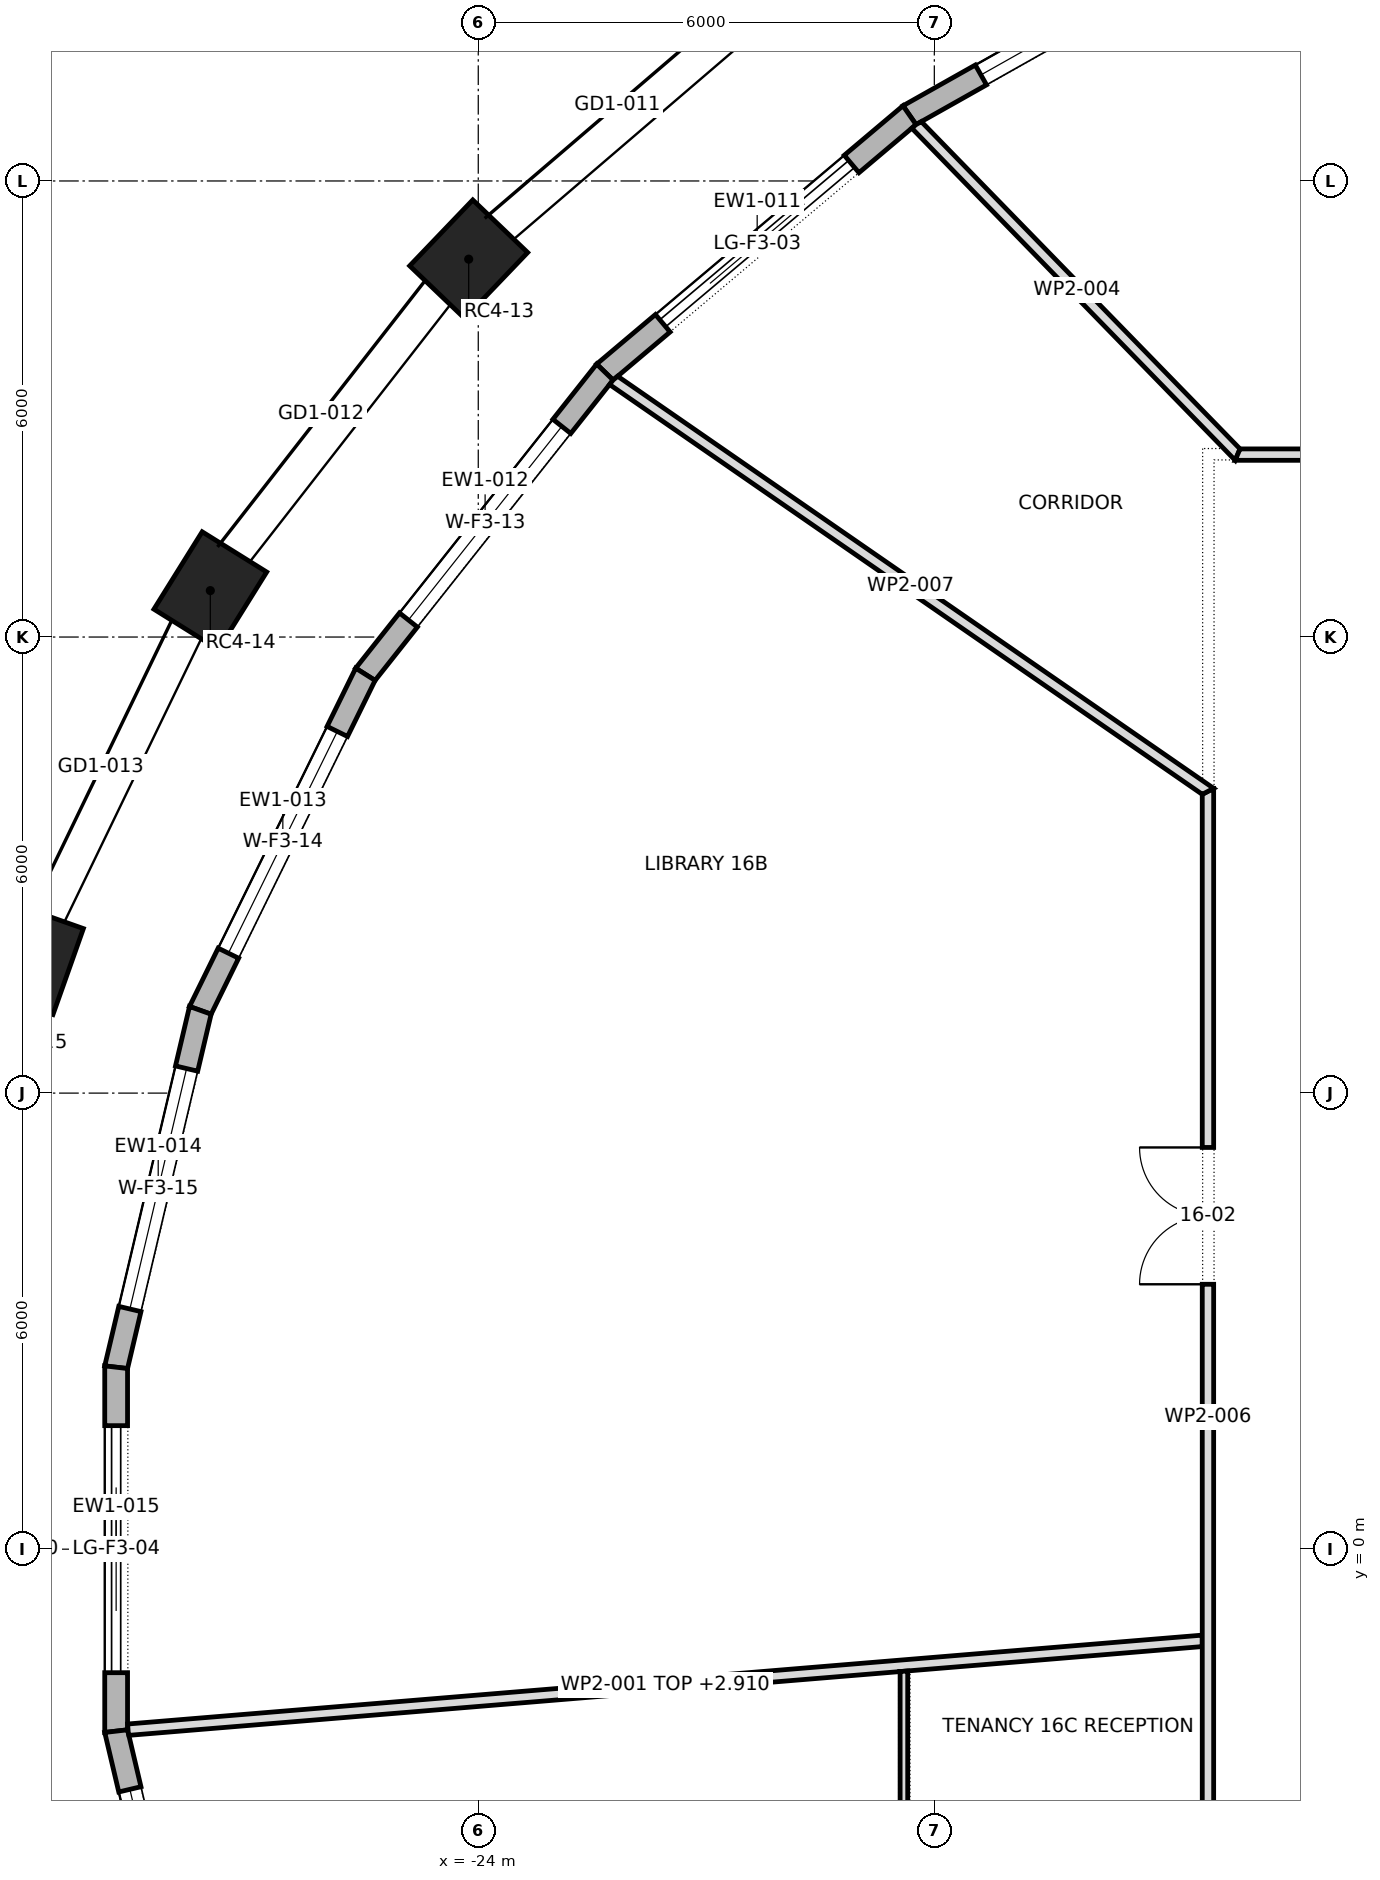
"""IFC4 building model, lengths in metres.
Left out: names, types, materials, properties, quantities, classifications, styles, units other than length and angle.
Written with IfcOpenShell. Run it as: python <this file> out.ifc"""

import sys

from ifc_helpers import new_model, si_unit, direction, frame, frame_2d, origin, origin_2d, place, context, subcontext, project, spatial, polyline, rectangle, outline, extrude, element, fill, save


model = new_model("IFC4")
c1 = context("Model", 3, precision=1e-05, world=origin(), true_north=direction((0.0, 1.0)))
c2 = subcontext(c1, "Body", "Model", "MODEL_VIEW")
j1 = project(units=[si_unit("LENGTHUNIT", "METRE"), si_unit("PLANEANGLEUNIT", "RADIAN")], contexts=[c1])
p1 = place(None, origin())
s1 = spatial("IfcSite", under=j1, at=p1, CompositionType="ELEMENT")
p2 = place(p1, origin())
s2 = spatial("IfcBuilding", under=s1, at=p2, CompositionType="ELEMENT")
p3 = place(p2, frame((0.0, 0.0, 234.9)))
s3 = spatial("IfcBuildingStorey", under=s2, at=p3, CompositionType="ELEMENT", Elevation=234.9)
for number, where, z_axis, x_axis in (
    (1, (-24.126, 16.971, 0.0), (0.0, 0.0, 1.0), (-0.692, -0.722, 0.0)),
    (2, (-27.525, 12.611, 0.0), (0.0, 0.0, 1.0), (-0.529, -0.849, 0.0)),
    (3, (-29.867, 7.766, 0.0), (0.0, 0.0, 1.0), (-0.334, -0.943, 0.0)),
):
    element("IfcColumn", number, at=place(p3, frame(where, z_axis=z_axis, x_axis=x_axis)), inside=s3, PredefinedType="COLUMN", context=c2, shape_type="SweptSolid", body=[
        extrude(rectangle(XDim=1.2, YDim=1.0, at=origin_2d()), origin(), (0.0, 0.0, 1.0), 4.0),
    ])
p4 = place(p3, frame((-13.616, 21.52, 0.0), z_axis=(0.0, 0.0, 1.0), x_axis=(-0.871225596594, -0.490882837181, 0.0)))
e4 = element("IfcWall", 4, at=p4, inside=s3, PredefinedType="STANDARD", context=c2, shape_type="SweptSolid", body=[
    extrude(outline(polyline([(-0.013, -0.15), (5.421, -0.15), (5.393, 0.15), (0.013, 0.15), (-0.013, -0.15)])), origin(), (0.0, 0.0, 1.0), 3.7),
])
p5 = place(p4, frame((1.078, 0.0, 0.6)))
e5 = element("IfcOpeningElement", 5, at=p5, cuts=e4, PredefinedType="OPENING", context=c2, shape_type="SweptSolid", body=[
    extrude(rectangle(XDim=3.25, YDim=2.65, at=frame_2d((1.625, 1.325))), frame((0.0, 0.162, 0.0), z_axis=(0.0, -1.0, 0.0), x_axis=(1.0, 0.0, 0.0)), (0.0, 0.0, 1.0), 0.324),
])
p6 = place(p3, frame((-18.326, 18.865, 0.0), z_axis=(0.0, 0.0, 1.0), x_axis=(-0.764475071601, -0.644653290459, 0.0)))
e6 = element("IfcWall", 6, at=p6, inside=s3, PredefinedType="STANDARD", context=c2, shape_type="SweptSolid", body=[
    extrude(outline(polyline([(-0.014, -0.15), (5.258, -0.15), (5.228, 0.15), (0.014, 0.15), (-0.014, -0.15)])), origin(), (0.0, 0.0, 1.0), 3.7),
])
p7 = place(p6, frame((0.996, 0.0, 0.0)))
e7 = element("IfcOpeningElement", 7, at=p7, cuts=e6, PredefinedType="OPENING", context=c2, shape_type="SweptSolid", body=[
    extrude(rectangle(XDim=3.25, YDim=3.25, at=frame_2d((1.625, 1.625))), frame((0.0, 0.162, 0.0), z_axis=(0.0, -1.0, 0.0), x_axis=(1.0, 0.0, 0.0)), (0.0, 0.0, 1.0), 0.324),
])
p8 = place(p3, frame((-22.334, 15.486, 0.0), z_axis=(0.0, 0.0, 1.0), x_axis=(-0.621084984443, -0.783743224596, 0.0)))
e8 = element("IfcWall", 8, at=p8, inside=s3, PredefinedType="STANDARD", context=c2, shape_type="SweptSolid", body=[
    extrude(outline(polyline([(-0.015, -0.15), (5.089, -0.15), (5.057, 0.15), (0.015, 0.15), (-0.015, -0.15)])), origin(), (0.0, 0.0, 1.0), 3.7),
])
p9 = place(p8, frame((0.912, 0.0, 0.6)))
e9 = element("IfcOpeningElement", 9, at=p9, cuts=e8, PredefinedType="OPENING", context=c2, shape_type="SweptSolid", body=[
    extrude(rectangle(XDim=3.25, YDim=2.65, at=frame_2d((1.625, 1.325))), frame((0.0, 0.162, 0.0), z_axis=(0.0, -1.0, 0.0), x_axis=(1.0, 0.0, 0.0)), (0.0, 0.0, 1.0), 0.324),
])
p10 = place(p3, frame((-25.485, 11.51, 0.0), z_axis=(0.0, 0.0, 1.0), x_axis=(-0.440857641837, -0.897577038272, 0.0)))
e10 = element("IfcWall", 10, at=p10, inside=s3, PredefinedType="STANDARD", context=c2, shape_type="SweptSolid", body=[
    extrude(outline(polyline([(-0.016, -0.15), (4.942, -0.15), (4.908, 0.15), (0.016, 0.15), (-0.016, -0.15)])), origin(), (0.0, 0.0, 1.0), 3.7),
])
p11 = place(p10, frame((0.838, 0.0, 0.6)))
e11 = element("IfcOpeningElement", 11, at=p11, cuts=e10, PredefinedType="OPENING", context=c2, shape_type="SweptSolid", body=[
    extrude(rectangle(XDim=3.25, YDim=2.65, at=frame_2d((1.625, 1.325))), frame((0.0, 0.162, 0.0), z_axis=(0.0, -1.0, 0.0), x_axis=(1.0, 0.0, 0.0)), (0.0, 0.0, 1.0), 0.324),
])
p12 = place(p3, frame((-27.656, 7.089, 0.0), z_axis=(0.0, 0.0, 1.0), x_axis=(-0.229617574796, -0.97328093033, 0.0)))
e12 = element("IfcWall", 12, at=p12, inside=s3, PredefinedType="STANDARD", context=c2, shape_type="SweptSolid", body=[
    extrude(outline(polyline([(-0.017, -0.15), (4.841, -0.15), (4.807, 0.15), (0.017, 0.15), (-0.017, -0.15)])), origin(), (0.0, 0.0, 1.0), 3.7),
])
p13 = place(p12, frame((0.787, 0.0, 0.6)))
e13 = element("IfcOpeningElement", 13, at=p13, cuts=e12, PredefinedType="OPENING", context=c2, shape_type="SweptSolid", body=[
    extrude(rectangle(XDim=3.25, YDim=2.65, at=frame_2d((1.625, 1.325))), frame((0.0, 0.162, 0.0), z_axis=(0.0, -1.0, 0.0), x_axis=(1.0, 0.0, 0.0)), (0.0, 0.0, 1.0), 0.324),
])
p14 = place(p3, frame((-28.764, 2.394, 0.0), z_axis=(0.0, 0.0, 1.0), x_axis=(0.0, -1.0, 0.0)))
e14 = element("IfcWall", 14, at=p14, inside=s3, PredefinedType="STANDARD", context=c2, shape_type="SweptSolid", body=[
    extrude(outline(polyline([(-0.017, -0.15), (4.805, -0.15), (4.77, 0.15), (0.017, 0.15), (-0.017, -0.15)])), origin(), (0.0, 0.0, 1.0), 3.7),
])
p15 = place(p14, frame((0.769, 0.0, 0.0)))
e15 = element("IfcOpeningElement", 15, at=p15, cuts=e14, PredefinedType="OPENING", context=c2, shape_type="SweptSolid", body=[
    extrude(rectangle(XDim=3.25, YDim=3.25, at=frame_2d((1.625, 1.625))), frame((0.0, 0.162, 0.0), z_axis=(0.0, -1.0, 0.0), x_axis=(1.0, 0.0, 0.0)), (0.0, 0.0, 1.0), 0.324),
])
p16 = place(p3, frame((-28.764, -2.394, 0.0), z_axis=(0.0, 0.0, 1.0), x_axis=(0.229617574796, -0.97328093033, 0.0)))
e16 = element("IfcWall", 16, at=p16, inside=s3, PredefinedType="STANDARD", context=c2, shape_type="SweptSolid", body=[
    extrude(outline(polyline([(-0.017, -0.15), (4.841, -0.15), (4.807, 0.15), (0.017, 0.15), (-0.017, -0.15)])), origin(), (0.0, 0.0, 1.0), 3.7),
])
p17 = place(p16, frame((0.787, 0.0, 0.6)))
e17 = element("IfcOpeningElement", 17, at=p17, cuts=e16, PredefinedType="OPENING", context=c2, shape_type="SweptSolid", body=[
    extrude(rectangle(XDim=3.25, YDim=2.65, at=frame_2d((1.625, 1.325))), frame((0.0, 0.162, 0.0), z_axis=(0.0, -1.0, 0.0), x_axis=(1.0, 0.0, 0.0)), (0.0, 0.0, 1.0), 0.324),
])
p18 = place(p3, frame((-28.608, -2.375, 0.0), z_axis=(0.0, 0.0, 1.0), x_axis=(0.996598135394, 0.082414540768, 0.0)))
e18 = element("IfcWall", 18, at=p18, inside=s3, PredefinedType="PARTITIONING", context=c2, shape_type="SweptSolid", body=[
    extrude(outline(polyline([(0.005, -0.075), (1.701, -0.075), (3.398, -0.075), (5.095, -0.075), (6.792, -0.075), (8.489, -0.075), (10.186, -0.075), (10.186, -0.075), (10.189, -0.075), (12.182, -0.075), (14.175, -0.075), (14.187, 0.071), (14.187, 0.075), (12.413, 0.075), (10.64, 0.075), (8.867, 0.075), (7.093, 0.075), (5.32, 0.075), (3.547, 0.075), (1.773, 0.075), (0.0, 0.075), (0.0, -0.044), (0.005, -0.075)])), origin(), (0.0, 0.0, 1.0), 2.91),
])
p19 = place(p3, frame((-18.4, -8.232, 0.0), z_axis=(0.0, 0.0, 1.0), x_axis=(0.0, 1.0, 0.0)))
e19 = element("IfcWall", 19, at=p19, inside=s3, PredefinedType="PARTITIONING", context=c2, shape_type="SweptSolid", body=[
    extrude(outline(polyline([(6.63, -0.05), (6.63, -0.048), (6.622, 0.05), (4.967, 0.05), (3.311, 0.05), (1.656, 0.05), (0.0, 0.05), (0.0, 0.05), (0.045, -0.05), (1.691, -0.05), (3.338, -0.05), (4.984, -0.05), (6.63, -0.05)])), origin(), (0.0, 0.0, 1.0), 3.7),
])
p20 = place(p19, frame((2.873, 0.0, 0.0)))
e20 = element("IfcOpeningElement", 20, at=p20, cuts=e19, PredefinedType="OPENING", context=c2, shape_type="SweptSolid", body=[
    extrude(rectangle(XDim=0.9, YDim=2.1, at=frame_2d((0.45, 1.05))), frame((0.0, 0.062, 0.0), z_axis=(0.0, -1.0, 0.0), x_axis=(1.0, 0.0, 0.0)), (0.0, 0.0, 1.0), 0.124),
])
p21 = place(p3, frame((-18.242, 18.747, 0.0), z_axis=(0.0, 0.0, 1.0), x_axis=(0.697616683155, -0.716471188105, 0.0)))
e21 = element("IfcWall", 21, at=p21, inside=s3, PredefinedType="PARTITIONING", context=c2, shape_type="SweptSolid", body=[
    extrude(outline(polyline([(0.0, -0.075), (1.525, -0.075), (3.049, -0.075), (4.574, -0.075), (6.099, -0.075), (6.067, 0.0), (6.035, 0.075), (4.533, 0.075), (3.031, 0.075), (1.528, 0.075), (0.025, 0.075), (0.005, -0.002), (0.0, -0.072), (0.0, -0.075)])), origin(), (0.0, 0.0, 1.0), 3.7),
])
p22 = place(p3, frame((-14.4, -6.49, 0.0), z_axis=(0.0, 0.0, 1.0), x_axis=(0.0, 1.0, 0.0)))
e22 = element("IfcWall", 22, at=p22, inside=s3, PredefinedType="PARTITIONING", context=c2, shape_type="SweptSolid", body=[
    extrude(outline(polyline([(16.499, -0.075), (16.499, -0.075), (16.421, 0.075), (14.596, 0.075), (12.772, 0.075), (10.947, 0.075), (9.123, 0.075), (7.298, 0.075), (5.474, 0.075), (3.649, 0.075), (1.824, 0.075), (0.0, 0.075), (0.0, -0.075), (1.833, -0.075), (3.667, -0.075), (5.5, -0.075), (7.333, -0.075), (9.166, -0.075), (11.0, -0.075), (12.833, -0.075), (14.666, -0.075), (16.499, -0.075)])), origin(), (0.0, 0.0, 1.0), 3.7),
])
p23 = place(p22, frame((9.975, 0.0, 0.0)))
e23 = element("IfcOpeningElement", 23, at=p23, cuts=e22, PredefinedType="OPENING", context=c2, shape_type="SweptSolid", body=[
    extrude(rectangle(XDim=1.8, YDim=2.1, at=frame_2d((0.9, 1.05))), frame((0.0, 0.087, 0.0), z_axis=(0.0, -1.0, 0.0), x_axis=(1.0, 0.0, 0.0)), (0.0, 0.0, 1.0), 0.174),
])
p24 = place(p22, frame((2.145, 0.0, 0.0)))
e24 = element("IfcOpeningElement", 24, at=p24, cuts=e22, PredefinedType="OPENING", context=c2, shape_type="SweptSolid", body=[
    extrude(rectangle(XDim=1.0, YDim=2.1, at=frame_2d((0.5, 1.05))), frame((0.0, 0.087, 0.0), z_axis=(0.0, -1.0, 0.0), x_axis=(1.0, 0.0, 0.0)), (0.0, 0.0, 1.0), 0.174),
])
p25 = place(p3, frame((-14.368, 9.948, 0.0), z_axis=(0.0, 0.0, 1.0), x_axis=(-0.822511136101, 0.568749005265, 0.0)))
e25 = element("IfcWall", 25, at=p25, inside=s3, PredefinedType="PARTITIONING", context=c2, shape_type="SweptSolid", body=[
    extrude(outline(polyline([(0.0, -0.075), (1.907, -0.075), (3.813, -0.075), (5.72, -0.075), (7.627, -0.075), (9.533, -0.075), (9.554, 0.0), (9.558, 0.069), (9.558, 0.075), (7.662, 0.075), (5.767, 0.075), (3.871, 0.075), (1.975, 0.075), (0.079, 0.075), (0.079, 0.075), (0.079, 0.075), (0.039, 0.0), (0.0, -0.075)])), origin(), (0.0, 0.0, 1.0), 3.7),
])
p26 = place(p3, frame((-14.042, 14.4, 0.0), z_axis=(0.0, 0.0, 1.0), x_axis=(1.0, 0.0, 0.0)))
e26 = element("IfcWall", 26, at=p26, inside=s3, PredefinedType="PARTITIONING", context=c2, shape_type="SweptSolid", body=[
    extrude(outline(polyline([(0.0, -0.075), (1.872, -0.075), (3.745, -0.075), (5.617, -0.075), (7.489, -0.075), (9.361, -0.075), (11.233, -0.075), (13.106, -0.075), (14.978, -0.075), (16.85, -0.075), (18.722, -0.075), (20.594, -0.075), (22.467, -0.075), (24.339, -0.075), (26.211, -0.075), (28.083, -0.075), (28.02, 0.075), (26.023, 0.075), (24.026, 0.075), (22.029, 0.075), (20.032, 0.075), (18.036, 0.075), (16.039, 0.075), (14.042, 0.075), (12.045, 0.075), (10.048, 0.075), (8.051, 0.075), (6.054, 0.075), (4.057, 0.075), (2.06, 0.075), (0.063, 0.075), (0.0, -0.075)])), origin(), (0.0, 0.0, 1.0), 3.7),
])
p27 = place(p26, frame((13.142, 0.0, 0.0)))
e27 = element("IfcOpeningElement", 27, at=p27, cuts=e26, PredefinedType="OPENING", context=c2, shape_type="SweptSolid", body=[
    extrude(rectangle(XDim=1.8, YDim=2.1, at=frame_2d((0.9, 1.05))), frame((0.0, 0.087, 0.0), z_axis=(0.0, -1.0, 0.0), x_axis=(1.0, 0.0, 0.0)), (0.0, 0.0, 1.0), 0.174),
])
p28 = place(p5, origin())
e28 = element("IfcWindow", 28, at=p28, inside=s3, PartitioningType="TRIPLE_PANEL_VERTICAL", PredefinedType="WINDOW", context=c2, shape_type="SweptSolid", body=[
    extrude(rectangle(XDim=3.25, YDim=2.65, at=frame_2d((1.625, 1.325))), frame((0.0, 0.03, 0.0), z_axis=(0.0, -1.0, 0.0), x_axis=(1.0, 0.0, 0.0)), (0.0, 0.0, 1.0), 0.06),
])
fill(e5, e28)
p29 = place(p7, origin())
e29 = element("IfcDoor", 29, at=p29, inside=s3, OperationType="DOUBLE_DOOR_SLIDING", PredefinedType="DOOR", context=c2, shape_type="SweptSolid", body=[
    extrude(rectangle(XDim=3.25, YDim=3.25, at=frame_2d((1.625, 1.625))), frame((0.0, 0.025, 0.0), z_axis=(0.0, -1.0, 0.0), x_axis=(1.0, 0.0, 0.0)), (0.0, 0.0, 1.0), 0.05),
])
fill(e7, e29)
p30 = place(p9, origin())
e30 = element("IfcWindow", 30, at=p30, inside=s3, PartitioningType="TRIPLE_PANEL_VERTICAL", PredefinedType="WINDOW", context=c2, shape_type="SweptSolid", body=[
    extrude(rectangle(XDim=3.25, YDim=2.65, at=frame_2d((1.625, 1.325))), frame((0.0, 0.03, 0.0), z_axis=(0.0, -1.0, 0.0), x_axis=(1.0, 0.0, 0.0)), (0.0, 0.0, 1.0), 0.06),
])
fill(e9, e30)
p31 = place(p11, origin())
e31 = element("IfcWindow", 31, at=p31, inside=s3, PartitioningType="TRIPLE_PANEL_VERTICAL", PredefinedType="WINDOW", context=c2, shape_type="SweptSolid", body=[
    extrude(rectangle(XDim=3.25, YDim=2.65, at=frame_2d((1.625, 1.325))), frame((0.0, 0.03, 0.0), z_axis=(0.0, -1.0, 0.0), x_axis=(1.0, 0.0, 0.0)), (0.0, 0.0, 1.0), 0.06),
])
fill(e11, e31)
p32 = place(p13, origin())
e32 = element("IfcWindow", 32, at=p32, inside=s3, PartitioningType="TRIPLE_PANEL_VERTICAL", PredefinedType="WINDOW", context=c2, shape_type="SweptSolid", body=[
    extrude(rectangle(XDim=3.25, YDim=2.65, at=frame_2d((1.625, 1.325))), frame((0.0, 0.03, 0.0), z_axis=(0.0, -1.0, 0.0), x_axis=(1.0, 0.0, 0.0)), (0.0, 0.0, 1.0), 0.06),
])
fill(e13, e32)
p33 = place(p15, origin())
e33 = element("IfcDoor", 33, at=p33, inside=s3, OperationType="DOUBLE_DOOR_SLIDING", PredefinedType="DOOR", context=c2, shape_type="SweptSolid", body=[
    extrude(rectangle(XDim=3.25, YDim=3.25, at=frame_2d((1.625, 1.625))), frame((0.0, 0.025, 0.0), z_axis=(0.0, -1.0, 0.0), x_axis=(1.0, 0.0, 0.0)), (0.0, 0.0, 1.0), 0.05),
])
fill(e15, e33)
p34 = place(p17, origin())
e34 = element("IfcWindow", 34, at=p34, inside=s3, PartitioningType="TRIPLE_PANEL_VERTICAL", PredefinedType="WINDOW", context=c2, shape_type="SweptSolid", body=[
    extrude(rectangle(XDim=3.25, YDim=2.65, at=frame_2d((1.625, 1.325))), frame((0.0, 0.03, 0.0), z_axis=(0.0, -1.0, 0.0), x_axis=(1.0, 0.0, 0.0)), (0.0, 0.0, 1.0), 0.06),
])
fill(e17, e34)
p35 = place(p23, origin())
e35 = element("IfcDoor", 35, at=p35, inside=s3, OperationType="DOUBLE_DOOR_SINGLE_SWING", PredefinedType="DOOR", context=c2, shape_type="SweptSolid", body=[
    extrude(rectangle(XDim=1.8, YDim=2.1, at=frame_2d((0.9, 1.05))), frame((0.0, 0.025, 0.0), z_axis=(0.0, -1.0, 0.0), x_axis=(1.0, 0.0, 0.0)), (0.0, 0.0, 1.0), 0.05),
])
fill(e23, e35)
save(model, sys.argv[1])
